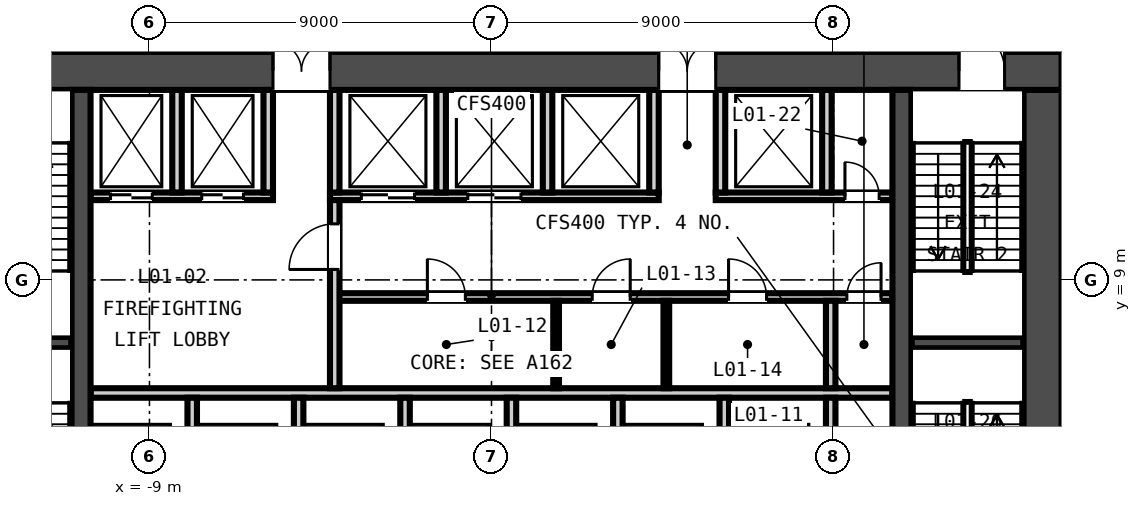
"""IFC4 building model, lengths in metres.
Left out: names, types, materials, properties, quantities, classifications, styles, units other than length and angle.
Written with IfcOpenShell. Run it as: python <this file> out.ifc"""

import sys

from ifc_helpers import new_model, si_unit, direction, frame, frame_2d, origin, place, context, subcontext, project, spatial, rectangle, extrude, element, fill, save


model = new_model("IFC4")
c1 = context("Model", 3, precision=1e-05, world=origin(), true_north=direction((0.0, 1.0)))
c2 = subcontext(c1, "Body", "Model", "MODEL_VIEW")
j1 = project(units=[si_unit("LENGTHUNIT", "METRE"), si_unit("PLANEANGLEUNIT", "RADIAN")], contexts=[c1])
p1 = place(None, origin())
s1 = spatial("IfcSite", under=j1, at=p1, CompositionType="ELEMENT")
p2 = place(p1, origin())
s2 = spatial("IfcBuilding", under=s1, at=p2, CompositionType="ELEMENT")
p3 = place(p2, frame((0.0, 0.0, 9.0)))
s3 = spatial("IfcBuildingStorey", under=s2, at=p3, CompositionType="ELEMENT", Elevation=9.0)
p4 = place(p3, frame((-15.0, 14.5, -0.4), z_axis=(0.0, 0.0, 1.0), x_axis=(1.0, 0.0, 0.0)))
e1 = element("IfcWall", 1, at=p4, inside=s3, PredefinedType="SOLIDWALL", context=c2, shape_type="SweptSolid", body=[
    extrude(rectangle(XDim=30.0, YDim=1.0, at=frame_2d((15.0, 0.0))), origin(), (0.0, 0.0, 1.0), 9.0),
])
p5 = place(p4, frame((9.25, 0.0, 0.4)))
e2 = element("IfcOpeningElement", 2, at=p5, cuts=e1, PredefinedType="OPENING", context=c2, shape_type="SweptSolid", body=[
    extrude(rectangle(XDim=1.5, YDim=2.1, at=frame_2d((0.75, 1.05))), frame((0.0, 0.51, 0.0), z_axis=(0.0, -1.0, 0.0), x_axis=(1.0, 0.0, 0.0)), (0.0, 0.0, 1.0), 1.02),
])
p6 = place(p4, frame((19.4, 0.0, 0.4)))
e3 = element("IfcOpeningElement", 3, at=p6, cuts=e1, PredefinedType="OPENING", context=c2, shape_type="SweptSolid", body=[
    extrude(rectangle(XDim=1.5, YDim=2.1, at=frame_2d((0.75, 1.05))), frame((0.0, 0.51, 0.0), z_axis=(0.0, -1.0, 0.0), x_axis=(1.0, 0.0, 0.0)), (0.0, 0.0, 1.0), 1.02),
])
p7 = place(p4, frame((1.5, 0.0, 0.4)))
e4 = element("IfcOpeningElement", 4, at=p7, cuts=e1, PredefinedType="OPENING", context=c2, shape_type="SweptSolid", body=[
    extrude(rectangle(XDim=1.2, YDim=2.1, at=frame_2d((0.6, 1.05))), frame((0.0, 0.51, 0.0), z_axis=(0.0, -1.0, 0.0), x_axis=(1.0, 0.0, 0.0)), (0.0, 0.0, 1.0), 1.02),
])
p8 = place(p4, frame((27.3, 0.0, 0.4)))
e5 = element("IfcOpeningElement", 5, at=p8, cuts=e1, PredefinedType="OPENING", context=c2, shape_type="SweptSolid", body=[
    extrude(rectangle(XDim=1.2, YDim=2.1, at=frame_2d((0.6, 1.05))), frame((0.0, 0.51, 0.0), z_axis=(0.0, -1.0, 0.0), x_axis=(1.0, 0.0, 0.0)), (0.0, 0.0, 1.0), 1.02),
])
p9 = place(p3, frame((14.5, 1.0, -0.4), z_axis=(0.0, 0.0, 1.0), x_axis=(0.0, 1.0, 0.0)))
e6 = element("IfcWall", 6, at=p9, inside=s3, PredefinedType="SOLIDWALL", context=c2, shape_type="SweptSolid", body=[
    extrude(rectangle(XDim=13.0, YDim=1.0, at=frame_2d((6.5, 0.0))), origin(), (0.0, 0.0, 1.0), 9.0),
])
for number, where, z_axis, x_axis in (
    (7, (-10.8, 1.0, -0.4), (0.0, 0.0, 1.0), (0.0, 1.0, 0.0)),
    (8, (10.8, 1.0, -0.4), (0.0, 0.0, 1.0), (0.0, 1.0, 0.0)),
):
    element("IfcWall", number, at=place(p3, frame(where, z_axis=z_axis, x_axis=x_axis)), inside=s3, PredefinedType="SOLIDWALL", context=c2, shape_type="SweptSolid", body=[
        extrude(rectangle(XDim=13.0, YDim=0.5, at=frame_2d((6.5, 0.0))), origin(), (0.0, 0.0, 1.0), 9.0),
    ])
p10 = place(p3, frame((-10.55, 6.025, 0.0), z_axis=(0.0, 0.0, 1.0), x_axis=(1.0, 0.0, 0.0)))
e9 = element("IfcWall", 9, at=p10, inside=s3, PredefinedType="PARTITIONING", context=c2, shape_type="SweptSolid", body=[
    extrude(rectangle(XDim=21.1, YDim=0.25, at=frame_2d((10.55, 0.0))), origin(), (0.0, 0.0, 1.0), 8.6),
])
p11 = place(p3, frame((-4.125, 8.55, 0.0), z_axis=(0.0, 0.0, 1.0), x_axis=(1.0, 0.0, 0.0)))
e10 = element("IfcWall", 10, at=p11, inside=s3, PredefinedType="PARTITIONING", context=c2, shape_type="SweptSolid", body=[
    extrude(rectangle(XDim=14.675, YDim=0.2, at=frame_2d((7.337, 0.0))), origin(), (0.0, 0.0, 1.0), 8.6),
])
p12 = place(p11, frame((2.438, 0.0, 0.0)))
e11 = element("IfcOpeningElement", 11, at=p12, cuts=e10, PredefinedType="OPENING", context=c2, shape_type="SweptSolid", body=[
    extrude(rectangle(XDim=1.0, YDim=2.1, at=frame_2d((0.5, 1.05))), frame((0.0, 0.11, 0.0), z_axis=(0.0, -1.0, 0.0), x_axis=(1.0, 0.0, 0.0)), (0.0, 0.0, 1.0), 0.22),
])
p13 = place(p11, frame((6.775, 0.0, 0.0)))
e12 = element("IfcOpeningElement", 12, at=p13, cuts=e10, PredefinedType="OPENING", context=c2, shape_type="SweptSolid", body=[
    extrude(rectangle(XDim=1.0, YDim=2.1, at=frame_2d((0.5, 1.05))), frame((0.0, 0.11, 0.0), z_axis=(0.0, -1.0, 0.0), x_axis=(1.0, 0.0, 0.0)), (0.0, 0.0, 1.0), 0.22),
])
p14 = place(p11, frame((10.363, 0.0, 0.0)))
e13 = element("IfcOpeningElement", 13, at=p14, cuts=e10, PredefinedType="OPENING", context=c2, shape_type="SweptSolid", body=[
    extrude(rectangle(XDim=1.0, YDim=2.1, at=frame_2d((0.5, 1.05))), frame((0.0, 0.11, 0.0), z_axis=(0.0, -1.0, 0.0), x_axis=(1.0, 0.0, 0.0)), (0.0, 0.0, 1.0), 0.22),
])
p15 = place(p11, frame((13.475, 0.0, 0.0)))
e14 = element("IfcOpeningElement", 14, at=p15, cuts=e10, PredefinedType="OPENING", context=c2, shape_type="SweptSolid", body=[
    extrude(rectangle(XDim=0.9, YDim=2.1, at=frame_2d((0.45, 1.05))), frame((0.0, 0.11, 0.0), z_axis=(0.0, -1.0, 0.0), x_axis=(1.0, 0.0, 0.0)), (0.0, 0.0, 1.0), 0.22),
])
p16 = place(p3, frame((-10.55, 11.2, 0.0), z_axis=(0.0, 0.0, 1.0), x_axis=(1.0, 0.0, 0.0)))
e15 = element("IfcWall", 15, at=p16, inside=s3, PredefinedType="PARTITIONING", context=c2, shape_type="SweptSolid", body=[
    extrude(rectangle(XDim=4.8, YDim=0.2, at=frame_2d((2.4, 0.0))), origin(), (0.0, 0.0, 1.0), 8.6),
])
p17 = place(p16, frame((0.525, 0.0, 0.0)))
e16 = element("IfcOpeningElement", 16, at=p17, cuts=e15, PredefinedType="OPENING", context=c2, shape_type="SweptSolid", body=[
    extrude(rectangle(XDim=1.1, YDim=2.1, at=frame_2d((0.55, 1.05))), frame((0.0, 0.11, 0.0), z_axis=(0.0, -1.0, 0.0), x_axis=(1.0, 0.0, 0.0)), (0.0, 0.0, 1.0), 0.22),
])
p18 = place(p16, frame((2.925, 0.0, 0.0)))
e17 = element("IfcOpeningElement", 17, at=p18, cuts=e15, PredefinedType="OPENING", context=c2, shape_type="SweptSolid", body=[
    extrude(rectangle(XDim=1.1, YDim=2.1, at=frame_2d((0.55, 1.05))), frame((0.0, 0.11, 0.0), z_axis=(0.0, -1.0, 0.0), x_axis=(1.0, 0.0, 0.0)), (0.0, 0.0, 1.0), 0.22),
])
p19 = place(p3, frame((-4.25, 11.2, 0.0), z_axis=(0.0, 0.0, 1.0), x_axis=(1.0, 0.0, 0.0)))
e18 = element("IfcWall", 18, at=p19, inside=s3, PredefinedType="PARTITIONING", context=c2, shape_type="SweptSolid", body=[
    extrude(rectangle(XDim=8.65, YDim=0.2, at=frame_2d((4.325, 0.0))), origin(), (0.0, 0.0, 1.0), 8.6),
])
p20 = place(p19, frame((0.825, 0.0, 0.0)))
e19 = element("IfcOpeningElement", 19, at=p20, cuts=e18, PredefinedType="OPENING", context=c2, shape_type="SweptSolid", body=[
    extrude(rectangle(XDim=1.4, YDim=2.1, at=frame_2d((0.7, 1.05))), frame((0.0, 0.11, 0.0), z_axis=(0.0, -1.0, 0.0), x_axis=(1.0, 0.0, 0.0)), (0.0, 0.0, 1.0), 0.22),
])
p21 = place(p19, frame((3.625, 0.0, 0.0)))
e20 = element("IfcOpeningElement", 20, at=p21, cuts=e18, PredefinedType="OPENING", context=c2, shape_type="SweptSolid", body=[
    extrude(rectangle(XDim=1.4, YDim=2.1, at=frame_2d((0.7, 1.05))), frame((0.0, 0.11, 0.0), z_axis=(0.0, -1.0, 0.0), x_axis=(1.0, 0.0, 0.0)), (0.0, 0.0, 1.0), 0.22),
])
p22 = place(p3, frame((5.9, 11.2, 0.0), z_axis=(0.0, 0.0, 1.0), x_axis=(1.0, 0.0, 0.0)))
e21 = element("IfcWall", 21, at=p22, inside=s3, PredefinedType="PARTITIONING", context=c2, shape_type="SweptSolid", body=[
    extrude(rectangle(XDim=4.65, YDim=0.2, at=frame_2d((2.325, 0.0))), origin(), (0.0, 0.0, 1.0), 8.6),
])
p23 = place(p22, frame((3.4, 0.0, 0.0)))
e22 = element("IfcOpeningElement", 22, at=p23, cuts=e21, PredefinedType="OPENING", context=c2, shape_type="SweptSolid", body=[
    extrude(rectangle(XDim=0.9, YDim=2.1, at=frame_2d((0.45, 1.05))), frame((0.0, 0.11, 0.0), z_axis=(0.0, -1.0, 0.0), x_axis=(1.0, 0.0, 0.0)), (0.0, 0.0, 1.0), 0.22),
])
p24 = place(p3, frame((-4.125, 6.15, 0.0), z_axis=(0.0, 0.0, 1.0), x_axis=(0.0, 1.0, 0.0)))
e23 = element("IfcWall", 23, at=p24, inside=s3, PredefinedType="PARTITIONING", context=c2, shape_type="SweptSolid", body=[
    extrude(rectangle(XDim=4.95, YDim=0.25, at=frame_2d((2.475, 0.0))), origin(), (0.0, 0.0, 1.0), 8.6),
])
p25 = place(p24, frame((3.125, 0.0, 0.0)))
e24 = element("IfcOpeningElement", 24, at=p25, cuts=e23, PredefinedType="OPENING", context=c2, shape_type="SweptSolid", body=[
    extrude(rectangle(XDim=1.2, YDim=2.1, at=frame_2d((0.6, 1.05))), frame((0.0, 0.135, 0.0), z_axis=(0.0, -1.0, 0.0), x_axis=(1.0, 0.0, 0.0)), (0.0, 0.0, 1.0), 0.27),
])
for number, where, z_axis, x_axis in (
    (25, (-7.875, 3.6, 0.0), (0.0, 0.0, 1.0), (0.0, 1.0, 0.0)),
    (26, (-5.075, 3.6, 0.0), (0.0, 0.0, 1.0), (0.0, 1.0, 0.0)),
    (27, (-2.275, 3.6, 0.0), (0.0, 0.0, 1.0), (0.0, 1.0, 0.0)),
    (28, (0.525, 3.6, 0.0), (0.0, 0.0, 1.0), (0.0, 1.0, 0.0)),
    (29, (3.325, 3.6, 0.0), (0.0, 0.0, 1.0), (0.0, 1.0, 0.0)),
    (30, (6.125, 3.6, 0.0), (0.0, 0.0, 1.0), (0.0, 1.0, 0.0)),
    (31, (8.925, 3.6, 0.0), (0.0, 0.0, 1.0), (0.0, 1.0, 0.0)),
):
    element("IfcWall", number, at=place(p3, frame(where, z_axis=z_axis, x_axis=x_axis)), inside=s3, PredefinedType="PARTITIONING", context=c2, shape_type="SweptSolid", body=[
        extrude(rectangle(XDim=2.3, YDim=0.25, at=frame_2d((1.15, 0.0))), origin(), (0.0, 0.0, 1.0), 8.6),
    ])
for number, where, z_axis, x_axis in (
    (32, (1.7, 6.15, 0.0), (0.0, 0.0, 1.0), (0.0, 1.0, 0.0)),
    (33, (4.6, 6.15, 0.0), (0.0, 0.0, 1.0), (0.0, 1.0, 0.0)),
):
    element("IfcWall", number, at=place(p3, frame(where, z_axis=z_axis, x_axis=x_axis)), inside=s3, PredefinedType="PARTITIONING", context=c2, shape_type="SweptSolid", body=[
        extrude(rectangle(XDim=2.3, YDim=0.15, at=frame_2d((1.15, 0.0))), origin(), (0.0, 0.0, 1.0), 8.6),
    ])
p26 = place(p3, frame((8.925, 6.15, 0.0), z_axis=(0.0, 0.0, 1.0), x_axis=(0.0, 1.0, 0.0)))
e34 = element("IfcWall", 34, at=p26, inside=s3, PredefinedType="PARTITIONING", context=c2, shape_type="SweptSolid", body=[
    extrude(rectangle(XDim=2.3, YDim=0.25, at=frame_2d((1.15, 0.0))), origin(), (0.0, 0.0, 1.0), 8.6),
])
for number, where, z_axis, x_axis in (
    (35, (-8.275, 11.3, 0.0), (0.0, 0.0, 1.0), (0.0, 1.0, 0.0)),
    (36, (-5.875, 11.3, 0.0), (0.0, 0.0, 1.0), (0.0, 1.0, 0.0)),
    (37, (-4.125, 11.3, 0.0), (0.0, 0.0, 1.0), (0.0, 1.0, 0.0)),
    (38, (-1.325, 11.3, 0.0), (0.0, 0.0, 1.0), (0.0, 1.0, 0.0)),
    (39, (1.475, 11.3, 0.0), (0.0, 0.0, 1.0), (0.0, 1.0, 0.0)),
    (40, (4.275, 11.3, 0.0), (0.0, 0.0, 1.0), (0.0, 1.0, 0.0)),
    (41, (6.025, 11.3, 0.0), (0.0, 0.0, 1.0), (0.0, 1.0, 0.0)),
    (42, (8.825, 11.3, 0.0), (0.0, 0.0, 1.0), (0.0, 1.0, 0.0)),
):
    element("IfcWall", number, at=place(p3, frame(where, z_axis=z_axis, x_axis=x_axis)), inside=s3, PredefinedType="PARTITIONING", context=c2, shape_type="SweptSolid", body=[
        extrude(rectangle(XDim=2.7, YDim=0.25, at=frame_2d((1.35, 0.0))), origin(), (0.0, 0.0, 1.0), 8.6),
    ])
for number, where, z_axis, x_axis in (
    (43, (-14.0, 7.35, -0.4), (0.0, 0.0, 1.0), (1.0, 0.0, 0.0)),
    (44, (11.05, 7.35, -0.4), (0.0, 0.0, 1.0), (1.0, 0.0, 0.0)),
):
    element("IfcWall", number, at=place(p3, frame(where, z_axis=z_axis, x_axis=x_axis)), inside=s3, PredefinedType="SOLIDWALL", context=c2, shape_type="SweptSolid", body=[
        extrude(rectangle(XDim=2.95, YDim=0.3, at=frame_2d((1.475, 0.0))), origin(), (0.0, 0.0, 1.0), 9.0),
    ])
p27 = place(p25, origin())
e45 = element("IfcDoor", 45, at=p27, inside=s3, OperationType="SINGLE_SWING_LEFT", PredefinedType="DOOR", context=c2, shape_type="SweptSolid", body=[
    extrude(rectangle(XDim=1.2, YDim=2.1, at=frame_2d((0.6, 1.05))), frame((0.0, 0.025, 0.0), z_axis=(0.0, -1.0, 0.0), x_axis=(1.0, 0.0, 0.0)), (0.0, 0.0, 1.0), 0.05),
])
fill(e24, e45)
p28 = place(p12, origin())
e46 = element("IfcDoor", 46, at=p28, inside=s3, OperationType="SINGLE_SWING_LEFT", PredefinedType="DOOR", context=c2, shape_type="SweptSolid", body=[
    extrude(rectangle(XDim=1.0, YDim=2.1, at=frame_2d((0.5, 1.05))), frame((0.0, 0.025, 0.0), z_axis=(0.0, -1.0, 0.0), x_axis=(1.0, 0.0, 0.0)), (0.0, 0.0, 1.0), 0.05),
])
fill(e11, e46)
p29 = place(p13, origin())
e47 = element("IfcDoor", 47, at=p29, inside=s3, OperationType="SINGLE_SWING_RIGHT", PredefinedType="DOOR", context=c2, shape_type="SweptSolid", body=[
    extrude(rectangle(XDim=1.0, YDim=2.1, at=frame_2d((0.5, 1.05))), frame((0.0, 0.025, 0.0), z_axis=(0.0, -1.0, 0.0), x_axis=(1.0, 0.0, 0.0)), (0.0, 0.0, 1.0), 0.05),
])
fill(e12, e47)
p30 = place(p14, origin())
e48 = element("IfcDoor", 48, at=p30, inside=s3, OperationType="SINGLE_SWING_LEFT", PredefinedType="DOOR", context=c2, shape_type="SweptSolid", body=[
    extrude(rectangle(XDim=1.0, YDim=2.1, at=frame_2d((0.5, 1.05))), frame((0.0, 0.025, 0.0), z_axis=(0.0, -1.0, 0.0), x_axis=(1.0, 0.0, 0.0)), (0.0, 0.0, 1.0), 0.05),
])
fill(e13, e48)
p31 = place(p15, origin())
e49 = element("IfcDoor", 49, at=p31, inside=s3, OperationType="SINGLE_SWING_RIGHT", PredefinedType="DOOR", context=c2, shape_type="SweptSolid", body=[
    extrude(rectangle(XDim=0.9, YDim=2.1, at=frame_2d((0.45, 1.05))), frame((0.0, 0.025, 0.0), z_axis=(0.0, -1.0, 0.0), x_axis=(1.0, 0.0, 0.0)), (0.0, 0.0, 1.0), 0.05),
])
fill(e14, e49)
p32 = place(p17, origin())
e50 = element("IfcDoor", 50, at=p32, inside=s3, OperationType="DOUBLE_DOOR_SLIDING", PredefinedType="DOOR", context=c2, shape_type="SweptSolid", body=[
    extrude(rectangle(XDim=1.1, YDim=2.1, at=frame_2d((0.55, 1.05))), frame((0.0, 0.025, 0.0), z_axis=(0.0, -1.0, 0.0), x_axis=(1.0, 0.0, 0.0)), (0.0, 0.0, 1.0), 0.05),
])
fill(e16, e50)
p33 = place(p18, origin())
e51 = element("IfcDoor", 51, at=p33, inside=s3, OperationType="DOUBLE_DOOR_SLIDING", PredefinedType="DOOR", context=c2, shape_type="SweptSolid", body=[
    extrude(rectangle(XDim=1.1, YDim=2.1, at=frame_2d((0.55, 1.05))), frame((0.0, 0.025, 0.0), z_axis=(0.0, -1.0, 0.0), x_axis=(1.0, 0.0, 0.0)), (0.0, 0.0, 1.0), 0.05),
])
fill(e17, e51)
p34 = place(p20, origin())
e52 = element("IfcDoor", 52, at=p34, inside=s3, OperationType="DOUBLE_DOOR_SLIDING", PredefinedType="DOOR", context=c2, shape_type="SweptSolid", body=[
    extrude(rectangle(XDim=1.4, YDim=2.1, at=frame_2d((0.7, 1.05))), frame((0.0, 0.025, 0.0), z_axis=(0.0, -1.0, 0.0), x_axis=(1.0, 0.0, 0.0)), (0.0, 0.0, 1.0), 0.05),
])
fill(e19, e52)
p35 = place(p21, origin())
e53 = element("IfcDoor", 53, at=p35, inside=s3, OperationType="DOUBLE_DOOR_SLIDING", PredefinedType="DOOR", context=c2, shape_type="SweptSolid", body=[
    extrude(rectangle(XDim=1.4, YDim=2.1, at=frame_2d((0.7, 1.05))), frame((0.0, 0.025, 0.0), z_axis=(0.0, -1.0, 0.0), x_axis=(1.0, 0.0, 0.0)), (0.0, 0.0, 1.0), 0.05),
])
fill(e20, e53)
p36 = place(p23, origin())
e54 = element("IfcDoor", 54, at=p36, inside=s3, OperationType="SINGLE_SWING_LEFT", PredefinedType="DOOR", context=c2, shape_type="SweptSolid", body=[
    extrude(rectangle(XDim=0.9, YDim=2.1, at=frame_2d((0.45, 1.05))), frame((0.0, 0.025, 0.0), z_axis=(0.0, -1.0, 0.0), x_axis=(1.0, 0.0, 0.0)), (0.0, 0.0, 1.0), 0.05),
])
fill(e22, e54)
p37 = place(p5, origin())
e55 = element("IfcDoor", 55, at=p37, inside=s3, OperationType="DOUBLE_DOOR_SINGLE_SWING", PredefinedType="DOOR", context=c2, shape_type="SweptSolid", body=[
    extrude(rectangle(XDim=1.5, YDim=2.1, at=frame_2d((0.75, 1.05))), frame((0.0, 0.025, 0.0), z_axis=(0.0, -1.0, 0.0), x_axis=(1.0, 0.0, 0.0)), (0.0, 0.0, 1.0), 0.05),
])
fill(e2, e55)
p38 = place(p6, origin())
e56 = element("IfcDoor", 56, at=p38, inside=s3, OperationType="DOUBLE_DOOR_SINGLE_SWING", PredefinedType="DOOR", context=c2, shape_type="SweptSolid", body=[
    extrude(rectangle(XDim=1.5, YDim=2.1, at=frame_2d((0.75, 1.05))), frame((0.0, 0.025, 0.0), z_axis=(0.0, -1.0, 0.0), x_axis=(1.0, 0.0, 0.0)), (0.0, 0.0, 1.0), 0.05),
])
fill(e3, e56)
p39 = place(p8, origin())
e57 = element("IfcDoor", 57, at=p39, inside=s3, OperationType="SINGLE_SWING_LEFT", PredefinedType="DOOR", context=c2, shape_type="SweptSolid", body=[
    extrude(rectangle(XDim=1.2, YDim=2.1, at=frame_2d((0.6, 1.05))), frame((0.0, 0.025, 0.0), z_axis=(0.0, -1.0, 0.0), x_axis=(1.0, 0.0, 0.0)), (0.0, 0.0, 1.0), 0.05),
])
fill(e5, e57)
save(model, sys.argv[1])
